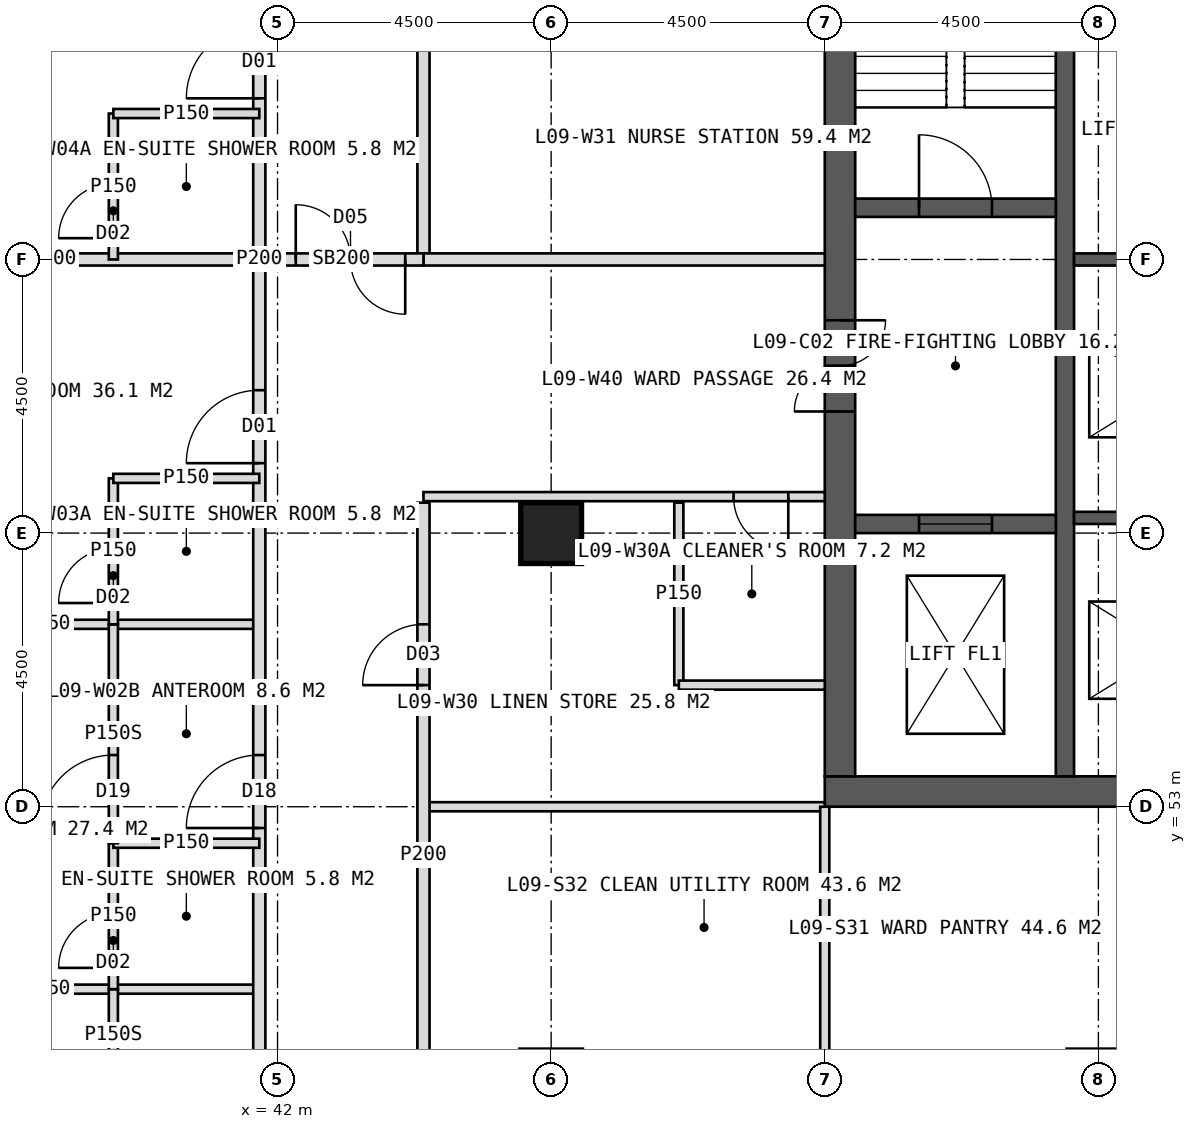
"""IFC4 building model, lengths in metres.
Left out: names, types, materials, properties, quantities, classifications, styles, units other than length and angle.
Written with IfcOpenShell. Run it as: python <this file> out.ifc"""

import sys

from ifc_helpers import new_model, si_unit, direction, frame, frame_2d, origin, origin_2d, place, context, subcontext, project, spatial, rectangle, hollow_rectangle, extrude, element, fill, save


model = new_model("IFC4")
c1 = context("Model", 3, precision=1e-05, world=origin(), true_north=direction((0.0, 1.0)))
c2 = subcontext(c1, "Body", "Model", "MODEL_VIEW")
j1 = project(units=[si_unit("LENGTHUNIT", "METRE"), si_unit("PLANEANGLEUNIT", "RADIAN")], contexts=[c1])
p1 = place(None, origin())
s1 = spatial("IfcSite", under=j1, at=p1, CompositionType="ELEMENT")
p2 = place(p1, origin())
s2 = spatial("IfcBuilding", under=s1, at=p2, CompositionType="ELEMENT")
p3 = place(p2, frame((0.0, 0.0, 43.0)))
s3 = spatial("IfcBuildingStorey", under=s2, at=p3, CompositionType="ELEMENT", Elevation=43.0)
p4 = place(p3, frame((51.0, 53.25, 0.0), z_axis=(0.0, 0.0, 1.0), x_axis=(1.0, 0.0, 0.0)))
e1 = element("IfcWall", 1, at=p4, inside=s3, PredefinedType="SHEAR", context=c2, shape_type="SweptSolid", body=[
    extrude(rectangle(XDim=18.0, YDim=0.5, at=frame_2d((9.0, 0.0))), origin(), (0.0, 0.0, 1.0), 4.0),
])
p5 = place(p4, frame((8.1, 0.0, 0.0)))
e2 = element("IfcOpeningElement", 2, at=p5, cuts=e1, PredefinedType="OPENING", context=c2, shape_type="SweptSolid", body=[
    extrude(rectangle(XDim=1.8, YDim=2.2, at=frame_2d((0.9, 1.1))), frame((0.0, 0.26, 0.0), z_axis=(0.0, -1.0, 0.0), x_axis=(1.0, 0.0, 0.0)), (0.0, 0.0, 1.0), 0.52),
])
p6 = place(p3, frame((51.25, 53.5, 0.0), z_axis=(0.0, 0.0, 1.0), x_axis=(0.0, 1.0, 0.0)))
e3 = element("IfcWall", 3, at=p6, inside=s3, PredefinedType="SHEAR", context=c2, shape_type="SweptSolid", body=[
    extrude(rectangle(XDim=17.0, YDim=0.5, at=frame_2d((8.5, 0.0))), origin(), (0.0, 0.0, 1.0), 4.0),
])
p7 = place(p6, frame((6.0, 0.0, 0.0)))
e4 = element("IfcOpeningElement", 4, at=p7, cuts=e3, PredefinedType="OPENING", context=c2, shape_type="SweptSolid", body=[
    extrude(rectangle(XDim=1.5, YDim=2.2, at=frame_2d((0.75, 1.1))), frame((0.0, 0.26, 0.0), z_axis=(0.0, -1.0, 0.0), x_axis=(1.0, 0.0, 0.0)), (0.0, 0.0, 1.0), 0.52),
])
p8 = place(p3, frame((54.95, 53.5, 0.0), z_axis=(0.0, 0.0, 1.0), x_axis=(0.0, 1.0, 0.0)))
e5 = element("IfcWall", 5, at=p8, inside=s3, PredefinedType="SHEAR", context=c2, shape_type="SweptSolid", body=[
    extrude(rectangle(XDim=17.0, YDim=0.3, at=frame_2d((8.5, 0.0))), origin(), (0.0, 0.0, 1.0), 4.0),
])
for number, where, z_axis, x_axis in (
    (6, (55.1, 57.75, 0.0), (0.0, 0.0, 1.0), (1.0, 0.0, 0.0)),
    (7, (55.1, 62.0, 0.0), (0.0, 0.0, 1.0), (1.0, 0.0, 0.0)),
):
    element("IfcWall", number, at=place(p3, frame(where, z_axis=z_axis, x_axis=x_axis)), inside=s3, PredefinedType="SHEAR", context=c2, shape_type="SweptSolid", body=[
        extrude(rectangle(XDim=3.05, YDim=0.2, at=frame_2d((1.525, 0.0))), origin(), (0.0, 0.0, 1.0), 4.0),
    ])
p9 = place(p3, frame((51.5, 62.85, 0.0), z_axis=(0.0, 0.0, 1.0), x_axis=(1.0, 0.0, 0.0)))
e8 = element("IfcWall", 8, at=p9, inside=s3, PredefinedType="SHEAR", context=c2, shape_type="SweptSolid", body=[
    extrude(rectangle(XDim=3.3, YDim=0.3, at=frame_2d((1.65, 0.0))), origin(), (0.0, 0.0, 1.0), 4.0),
])
p10 = place(p9, frame((1.05, 0.0, 0.0)))
e9 = element("IfcOpeningElement", 9, at=p10, cuts=e8, PredefinedType="OPENING", context=c2, shape_type="SweptSolid", body=[
    extrude(rectangle(XDim=1.2, YDim=2.1, at=frame_2d((0.6, 1.05))), frame((0.0, 0.16, 0.0), z_axis=(0.0, -1.0, 0.0), x_axis=(1.0, 0.0, 0.0)), (0.0, 0.0, 1.0), 0.32),
])
p11 = place(p3, frame((51.5, 57.65, 0.0), z_axis=(0.0, 0.0, 1.0), x_axis=(1.0, 0.0, 0.0)))
e10 = element("IfcWall", 10, at=p11, inside=s3, PredefinedType="SHEAR", context=c2, shape_type="SweptSolid", body=[
    extrude(rectangle(XDim=3.3, YDim=0.3, at=frame_2d((1.65, 0.0))), origin(), (0.0, 0.0, 1.0), 4.0),
])
p12 = place(p11, frame((1.05, 0.0, 0.0)))
e11 = element("IfcOpeningElement", 11, at=p12, cuts=e10, PredefinedType="OPENING", context=c2, shape_type="SweptSolid", body=[
    extrude(rectangle(XDim=1.2, YDim=2.2, at=frame_2d((0.6, 1.1))), frame((0.0, 0.16, 0.0), z_axis=(0.0, -1.0, 0.0), x_axis=(1.0, 0.0, 0.0)), (0.0, 0.0, 1.0), 0.32),
])
p13 = place(p3, frame((46.5, 57.5, 0.0), z_axis=(0.0, 0.0, 1.0), x_axis=(1.0, 0.0, 0.0)))
e12 = element("IfcColumn", 12, at=p13, inside=s3, PredefinedType="COLUMN", context=c2, shape_type="SweptSolid", body=[
    extrude(hollow_rectangle(XDim=1.0, YDim=1.0, WallThickness=0.1, at=origin_2d()), origin(), (0.0, 0.0, 1.0), 4.0),
])
for number, where, z_axis, x_axis in (
    (13, (41.7, 50.0, 0.0), (0.0, 0.0, 1.0), (-1.0, 0.0, 0.0)),
    (14, (41.7, 56.0, 0.0), (0.0, 0.0, 1.0), (-1.0, 0.0, 0.0)),
):
    element("IfcWall", number, at=place(p3, frame(where, z_axis=z_axis, x_axis=x_axis)), inside=s3, PredefinedType="PARTITIONING", context=c2, shape_type="SweptSolid", body=[
        extrude(rectangle(XDim=6.975, YDim=0.15, at=frame_2d((3.487, 0.0))), origin(), (0.0, 0.0, 1.0), 3.75),
    ])
p14 = place(p3, frame((41.7, 62.0, 0.0), z_axis=(0.0, 0.0, 1.0), x_axis=(-1.0, 0.0, 0.0)))
e15 = element("IfcWall", 15, at=p14, inside=s3, PredefinedType="SOLIDWALL", context=c2, shape_type="SweptSolid", body=[
    extrude(rectangle(XDim=6.975, YDim=0.2, at=frame_2d((3.487, 0.0))), origin(), (0.0, 0.0, 1.0), 2.75),
])
p15 = place(p3, frame((41.7, 43.7, 0.0), z_axis=(0.0, 0.0, 1.0), x_axis=(0.0, 1.0, 0.0)))
e16 = element("IfcWall", 16, at=p15, inside=s3, PredefinedType="PARTITIONING", context=c2, shape_type="SweptSolid", body=[
    extrude(rectangle(XDim=36.6, YDim=0.2, at=frame_2d((18.3, 0.0))), origin(), (0.0, 0.0, 1.0), 3.75),
])
p16 = place(p15, frame((2.65, 0.0, 0.0)))
e17 = element("IfcOpeningElement", 17, at=p16, cuts=e16, PredefinedType="OPENING", context=c2, shape_type="SweptSolid", body=[
    extrude(rectangle(XDim=1.2, YDim=2.2, at=frame_2d((0.6, 1.1))), frame((0.0, 0.11, 0.0), z_axis=(0.0, -1.0, 0.0), x_axis=(1.0, 0.0, 0.0)), (0.0, 0.0, 1.0), 0.22),
])
p17 = place(p15, frame((8.95, 0.0, 0.0)))
e18 = element("IfcOpeningElement", 18, at=p17, cuts=e16, PredefinedType="OPENING", context=c2, shape_type="SweptSolid", body=[
    extrude(rectangle(XDim=1.2, YDim=2.2, at=frame_2d((0.6, 1.1))), frame((0.0, 0.11, 0.0), z_axis=(0.0, -1.0, 0.0), x_axis=(1.0, 0.0, 0.0)), (0.0, 0.0, 1.0), 0.22),
])
p18 = place(p15, frame((14.95, 0.0, 0.0)))
e19 = element("IfcOpeningElement", 19, at=p18, cuts=e16, PredefinedType="OPENING", context=c2, shape_type="SweptSolid", body=[
    extrude(rectangle(XDim=1.2, YDim=2.2, at=frame_2d((0.6, 1.1))), frame((0.0, 0.11, 0.0), z_axis=(0.0, -1.0, 0.0), x_axis=(1.0, 0.0, 0.0)), (0.0, 0.0, 1.0), 0.22),
])
p19 = place(p15, frame((20.95, 0.0, 0.0)))
e20 = element("IfcOpeningElement", 20, at=p19, cuts=e16, PredefinedType="OPENING", context=c2, shape_type="SweptSolid", body=[
    extrude(rectangle(XDim=1.2, YDim=2.2, at=frame_2d((0.6, 1.1))), frame((0.0, 0.11, 0.0), z_axis=(0.0, -1.0, 0.0), x_axis=(1.0, 0.0, 0.0)), (0.0, 0.0, 1.0), 0.22),
])
p20 = place(p15, frame((29.95, 0.0, 0.0)))
e21 = element("IfcOpeningElement", 21, at=p20, cuts=e16, PredefinedType="OPENING", context=c2, shape_type="SweptSolid", body=[
    extrude(rectangle(XDim=1.2, YDim=2.2, at=frame_2d((0.6, 1.1))), frame((0.0, 0.11, 0.0), z_axis=(0.0, -1.0, 0.0), x_axis=(1.0, 0.0, 0.0)), (0.0, 0.0, 1.0), 0.22),
])
p21 = place(p3, frame((39.3, 48.5, 0.0), z_axis=(0.0, 0.0, 1.0), x_axis=(0.0, 1.0, 0.0)))
e22 = element("IfcWall", 22, at=p21, inside=s3, PredefinedType="PARTITIONING", context=c2, shape_type="SweptSolid", body=[
    extrude(rectangle(XDim=1.5, YDim=0.15, at=frame_2d((0.75, 0.0))), origin(), (0.0, 0.0, 1.0), 3.75),
])
p22 = place(p3, frame((39.3, 50.0, 0.0), z_axis=(0.0, 0.0, 1.0), x_axis=(0.0, 1.0, 0.0)))
e23 = element("IfcWall", 23, at=p22, inside=s3, PredefinedType="PARTITIONING", context=c2, shape_type="SweptSolid", body=[
    extrude(rectangle(XDim=2.4, YDim=0.15, at=frame_2d((1.2, 0.0))), origin(), (0.0, 0.0, 1.0), 3.75),
])
p23 = place(p22, frame((0.35, 0.0, 0.0)))
e24 = element("IfcOpeningElement", 24, at=p23, cuts=e23, PredefinedType="OPENING", context=c2, shape_type="SweptSolid", body=[
    extrude(rectangle(XDim=0.9, YDim=2.1, at=frame_2d((0.45, 1.05))), frame((0.0, 0.085, 0.0), z_axis=(0.0, -1.0, 0.0), x_axis=(1.0, 0.0, 0.0)), (0.0, 0.0, 1.0), 0.17),
])
p24 = place(p3, frame((41.7, 52.4, 0.0), z_axis=(0.0, 0.0, 1.0), x_axis=(-1.0, 0.0, 0.0)))
e25 = element("IfcWall", 25, at=p24, inside=s3, PredefinedType="PARTITIONING", context=c2, shape_type="SweptSolid", body=[
    extrude(rectangle(XDim=2.4, YDim=0.15, at=frame_2d((1.2, 0.0))), origin(), (0.0, 0.0, 1.0), 3.75),
])
p25 = place(p3, frame((39.3, 52.4, 0.0), z_axis=(0.0, 0.0, 1.0), x_axis=(0.0, 1.0, 0.0)))
e26 = element("IfcWall", 26, at=p25, inside=s3, PredefinedType="PARTITIONING", context=c2, shape_type="SweptSolid", body=[
    extrude(rectangle(XDim=3.6, YDim=0.15, at=frame_2d((1.8, 0.0))), origin(), (0.0, 0.0, 1.0), 3.75),
])
p26 = place(p25, frame((0.25, 0.0, 0.0)))
e27 = element("IfcOpeningElement", 27, at=p26, cuts=e26, PredefinedType="OPENING", context=c2, shape_type="SweptSolid", body=[
    extrude(rectangle(XDim=1.2, YDim=2.2, at=frame_2d((0.6, 1.1))), frame((0.0, 0.085, 0.0), z_axis=(0.0, -1.0, 0.0), x_axis=(1.0, 0.0, 0.0)), (0.0, 0.0, 1.0), 0.17),
])
p27 = place(p3, frame((39.3, 56.0, 0.0), z_axis=(0.0, 0.0, 1.0), x_axis=(0.0, 1.0, 0.0)))
e28 = element("IfcWall", 28, at=p27, inside=s3, PredefinedType="PARTITIONING", context=c2, shape_type="SweptSolid", body=[
    extrude(rectangle(XDim=2.4, YDim=0.15, at=frame_2d((1.2, 0.0))), origin(), (0.0, 0.0, 1.0), 3.75),
])
p28 = place(p27, frame((0.35, 0.0, 0.0)))
e29 = element("IfcOpeningElement", 29, at=p28, cuts=e28, PredefinedType="OPENING", context=c2, shape_type="SweptSolid", body=[
    extrude(rectangle(XDim=0.9, YDim=2.1, at=frame_2d((0.45, 1.05))), frame((0.0, 0.085, 0.0), z_axis=(0.0, -1.0, 0.0), x_axis=(1.0, 0.0, 0.0)), (0.0, 0.0, 1.0), 0.17),
])
p29 = place(p3, frame((41.7, 58.4, 0.0), z_axis=(0.0, 0.0, 1.0), x_axis=(-1.0, 0.0, 0.0)))
e30 = element("IfcWall", 30, at=p29, inside=s3, PredefinedType="PARTITIONING", context=c2, shape_type="SweptSolid", body=[
    extrude(rectangle(XDim=2.4, YDim=0.15, at=frame_2d((1.2, 0.0))), origin(), (0.0, 0.0, 1.0), 3.75),
])
p30 = place(p3, frame((39.3, 62.0, 0.0), z_axis=(0.0, 0.0, 1.0), x_axis=(0.0, 1.0, 0.0)))
e31 = element("IfcWall", 31, at=p30, inside=s3, PredefinedType="PARTITIONING", context=c2, shape_type="SweptSolid", body=[
    extrude(rectangle(XDim=2.4, YDim=0.15, at=frame_2d((1.2, 0.0))), origin(), (0.0, 0.0, 1.0), 3.75),
])
p31 = place(p30, frame((0.35, 0.0, 0.0)))
e32 = element("IfcOpeningElement", 32, at=p31, cuts=e31, PredefinedType="OPENING", context=c2, shape_type="SweptSolid", body=[
    extrude(rectangle(XDim=0.9, YDim=2.1, at=frame_2d((0.45, 1.05))), frame((0.0, 0.085, 0.0), z_axis=(0.0, -1.0, 0.0), x_axis=(1.0, 0.0, 0.0)), (0.0, 0.0, 1.0), 0.17),
])
p32 = place(p3, frame((41.7, 64.4, 0.0), z_axis=(0.0, 0.0, 1.0), x_axis=(-1.0, 0.0, 0.0)))
e33 = element("IfcWall", 33, at=p32, inside=s3, PredefinedType="PARTITIONING", context=c2, shape_type="SweptSolid", body=[
    extrude(rectangle(XDim=2.4, YDim=0.15, at=frame_2d((1.2, 0.0))), origin(), (0.0, 0.0, 1.0), 3.75),
])
p33 = place(p3, frame((51.0, 53.0, 0.0), z_axis=(0.0, 0.0, 1.0), x_axis=(-1.0, 0.0, 0.0)))
e34 = element("IfcWall", 34, at=p33, inside=s3, PredefinedType="PARTITIONING", context=c2, shape_type="SweptSolid", body=[
    extrude(rectangle(XDim=6.6, YDim=0.15, at=frame_2d((3.3, 0.0))), origin(), (0.0, 0.0, 1.0), 3.75),
])
p34 = place(p3, frame((44.4, 46.4, 0.0), z_axis=(0.0, 0.0, 1.0), x_axis=(0.0, 1.0, 0.0)))
e35 = element("IfcWall", 35, at=p34, inside=s3, PredefinedType="PARTITIONING", context=c2, shape_type="SweptSolid", body=[
    extrude(rectangle(XDim=11.6, YDim=0.2, at=frame_2d((5.8, 0.0))), origin(), (0.0, 0.0, 1.0), 3.75),
])
p35 = place(p34, frame((8.6, 0.0, 0.0)))
e36 = element("IfcOpeningElement", 36, at=p35, cuts=e35, PredefinedType="OPENING", context=c2, shape_type="SweptSolid", body=[
    extrude(rectangle(XDim=1.0, YDim=2.1, at=frame_2d((0.5, 1.05))), frame((0.0, 0.11, 0.0), z_axis=(0.0, -1.0, 0.0), x_axis=(1.0, 0.0, 0.0)), (0.0, 0.0, 1.0), 0.22),
])
p36 = place(p3, frame((44.4, 62.0, 0.0), z_axis=(0.0, 0.0, 1.0), x_axis=(0.0, 1.0, 0.0)))
e37 = element("IfcWall", 37, at=p36, inside=s3, PredefinedType="PARTITIONING", context=c2, shape_type="SweptSolid", body=[
    extrude(rectangle(XDim=15.6, YDim=0.2, at=frame_2d((7.8, 0.0))), origin(), (0.0, 0.0, 1.0), 3.75),
])
p37 = place(p36, frame((4.0, 0.0, 0.0)))
e38 = element("IfcOpeningElement", 38, at=p37, cuts=e37, PredefinedType="OPENING", context=c2, shape_type="SweptSolid", body=[
    extrude(rectangle(XDim=1.0, YDim=2.1, at=frame_2d((0.5, 1.05))), frame((0.0, 0.11, 0.0), z_axis=(0.0, -1.0, 0.0), x_axis=(1.0, 0.0, 0.0)), (0.0, 0.0, 1.0), 0.22),
])
p38 = place(p36, frame((11.8, 0.0, 0.0)))
e39 = element("IfcOpeningElement", 39, at=p38, cuts=e37, PredefinedType="OPENING", context=c2, shape_type="SweptSolid", body=[
    extrude(rectangle(XDim=1.0, YDim=2.1, at=frame_2d((0.5, 1.05))), frame((0.0, 0.11, 0.0), z_axis=(0.0, -1.0, 0.0), x_axis=(1.0, 0.0, 0.0)), (0.0, 0.0, 1.0), 0.22),
])
p39 = place(p3, frame((51.0, 58.1, 0.0), z_axis=(0.0, 0.0, 1.0), x_axis=(-1.0, 0.0, 0.0)))
e40 = element("IfcWall", 40, at=p39, inside=s3, PredefinedType="PARTITIONING", context=c2, shape_type="SweptSolid", body=[
    extrude(rectangle(XDim=6.6, YDim=0.15, at=frame_2d((3.3, 0.0))), origin(), (0.0, 0.0, 1.0), 3.75),
])
p40 = place(p39, frame((0.6, 0.0, 0.0)))
e41 = element("IfcOpeningElement", 41, at=p40, cuts=e40, PredefinedType="OPENING", context=c2, shape_type="SweptSolid", body=[
    extrude(rectangle(XDim=0.9, YDim=2.1, at=frame_2d((0.45, 1.05))), frame((0.0, 0.085, 0.0), z_axis=(0.0, -1.0, 0.0), x_axis=(1.0, 0.0, 0.0)), (0.0, 0.0, 1.0), 0.17),
])
p41 = place(p3, frame((51.0, 62.0, 0.0), z_axis=(0.0, 0.0, 1.0), x_axis=(-1.0, 0.0, 0.0)))
e42 = element("IfcWall", 42, at=p41, inside=s3, PredefinedType="SOLIDWALL", context=c2, shape_type="SweptSolid", body=[
    extrude(rectangle(XDim=6.6, YDim=0.2, at=frame_2d((3.3, 0.0))), origin(), (0.0, 0.0, 1.0), 2.75),
])
p42 = place(p3, frame((48.6, 55.0, 0.0), z_axis=(0.0, 0.0, 1.0), x_axis=(0.0, 1.0, 0.0)))
e43 = element("IfcWall", 43, at=p42, inside=s3, PredefinedType="PARTITIONING", context=c2, shape_type="SweptSolid", body=[
    extrude(rectangle(XDim=3.0, YDim=0.15, at=frame_2d((1.5, 0.0))), origin(), (0.0, 0.0, 1.0), 3.75),
])
p43 = place(p3, frame((51.0, 55.0, 0.0), z_axis=(0.0, 0.0, 1.0), x_axis=(-1.0, 0.0, 0.0)))
e44 = element("IfcWall", 44, at=p43, inside=s3, PredefinedType="PARTITIONING", context=c2, shape_type="SweptSolid", body=[
    extrude(rectangle(XDim=2.4, YDim=0.15, at=frame_2d((1.2, 0.0))), origin(), (0.0, 0.0, 1.0), 3.75),
])
p44 = place(p3, frame((51.0, 53.0, 0.0), z_axis=(0.0, 0.0, 1.0), x_axis=(0.0, -1.0, 0.0)))
e45 = element("IfcWall", 45, at=p44, inside=s3, PredefinedType="PARTITIONING", context=c2, shape_type="SweptSolid", body=[
    extrude(rectangle(XDim=6.6, YDim=0.15, at=frame_2d((3.3, 0.0))), origin(), (0.0, 0.0, 1.0), 3.75),
])
p45 = place(p3, frame((44.4, 62.0, 0.0), z_axis=(0.0, 0.0, 1.0), x_axis=(-1.0, 0.0, 0.0)))
e46 = element("IfcWall", 46, at=p45, inside=s3, PredefinedType="SOLIDWALL", context=c2, shape_type="SweptSolid", body=[
    extrude(rectangle(XDim=2.7, YDim=0.2, at=frame_2d((1.35, 0.0))), origin(), (0.0, 0.0, 1.0), 2.75),
])
p46 = place(p45, frame((0.3, 0.0, 0.0)))
e47 = element("IfcOpeningElement", 47, at=p46, cuts=e46, PredefinedType="OPENING", context=c2, shape_type="SweptSolid", body=[
    extrude(rectangle(XDim=1.8, YDim=2.2, at=frame_2d((0.9, 1.1))), frame((0.0, 0.11, 0.0), z_axis=(0.0, -1.0, 0.0), x_axis=(1.0, 0.0, 0.0)), (0.0, 0.0, 1.0), 0.22),
])
p47 = place(p26, origin())
e48 = element("IfcDoor", 48, at=p47, inside=s3, OperationType="SINGLE_SWING_LEFT", PredefinedType="DOOR", context=c2, shape_type="SweptSolid", body=[
    extrude(rectangle(XDim=1.2, YDim=2.2, at=frame_2d((0.6, 1.1))), frame((0.0, 0.025, 0.0), z_axis=(0.0, -1.0, 0.0), x_axis=(1.0, 0.0, 0.0)), (0.0, 0.0, 1.0), 0.05),
])
fill(e27, e48)
p48 = place(p17, origin())
e49 = element("IfcDoor", 49, at=p48, inside=s3, OperationType="SINGLE_SWING_LEFT", PredefinedType="DOOR", context=c2, shape_type="SweptSolid", body=[
    extrude(rectangle(XDim=1.2, YDim=2.2, at=frame_2d((0.6, 1.1))), frame((0.0, 0.025, 0.0), z_axis=(0.0, -1.0, 0.0), x_axis=(1.0, 0.0, 0.0)), (0.0, 0.0, 1.0), 0.05),
])
fill(e18, e49)
p49 = place(p23, origin())
e50 = element("IfcDoor", 50, at=p49, inside=s3, OperationType="SINGLE_SWING_LEFT", PredefinedType="DOOR", context=c2, shape_type="SweptSolid", body=[
    extrude(rectangle(XDim=0.9, YDim=2.1, at=frame_2d((0.45, 1.05))), frame((0.0, 0.025, 0.0), z_axis=(0.0, -1.0, 0.0), x_axis=(1.0, 0.0, 0.0)), (0.0, 0.0, 1.0), 0.05),
])
fill(e24, e50)
p50 = place(p18, origin())
e51 = element("IfcDoor", 51, at=p50, inside=s3, OperationType="SINGLE_SWING_LEFT", PredefinedType="DOOR", context=c2, shape_type="SweptSolid", body=[
    extrude(rectangle(XDim=1.2, YDim=2.2, at=frame_2d((0.6, 1.1))), frame((0.0, 0.025, 0.0), z_axis=(0.0, -1.0, 0.0), x_axis=(1.0, 0.0, 0.0)), (0.0, 0.0, 1.0), 0.05),
])
fill(e19, e51)
p51 = place(p28, origin())
e52 = element("IfcDoor", 52, at=p51, inside=s3, OperationType="SINGLE_SWING_LEFT", PredefinedType="DOOR", context=c2, shape_type="SweptSolid", body=[
    extrude(rectangle(XDim=0.9, YDim=2.1, at=frame_2d((0.45, 1.05))), frame((0.0, 0.025, 0.0), z_axis=(0.0, -1.0, 0.0), x_axis=(1.0, 0.0, 0.0)), (0.0, 0.0, 1.0), 0.05),
])
fill(e29, e52)
p52 = place(p19, origin())
e53 = element("IfcDoor", 53, at=p52, inside=s3, OperationType="SINGLE_SWING_LEFT", PredefinedType="DOOR", context=c2, shape_type="SweptSolid", body=[
    extrude(rectangle(XDim=1.2, YDim=2.2, at=frame_2d((0.6, 1.1))), frame((0.0, 0.025, 0.0), z_axis=(0.0, -1.0, 0.0), x_axis=(1.0, 0.0, 0.0)), (0.0, 0.0, 1.0), 0.05),
])
fill(e20, e53)
p53 = place(p31, origin())
e54 = element("IfcDoor", 54, at=p53, inside=s3, OperationType="SINGLE_SWING_LEFT", PredefinedType="DOOR", context=c2, shape_type="SweptSolid", body=[
    extrude(rectangle(XDim=0.9, YDim=2.1, at=frame_2d((0.45, 1.05))), frame((0.0, 0.025, 0.0), z_axis=(0.0, -1.0, 0.0), x_axis=(1.0, 0.0, 0.0)), (0.0, 0.0, 1.0), 0.05),
])
fill(e32, e54)
p54 = place(p40, origin())
e55 = element("IfcDoor", 55, at=p54, inside=s3, OperationType="SINGLE_SWING_LEFT", PredefinedType="DOOR", context=c2, shape_type="SweptSolid", body=[
    extrude(rectangle(XDim=0.9, YDim=2.1, at=frame_2d((0.45, 1.05))), frame((0.0, 0.025, 0.0), z_axis=(0.0, -1.0, 0.0), x_axis=(1.0, 0.0, 0.0)), (0.0, 0.0, 1.0), 0.05),
])
fill(e41, e55)
p55 = place(p35, origin())
e56 = element("IfcDoor", 56, at=p55, inside=s3, OperationType="SINGLE_SWING_LEFT", PredefinedType="DOOR", context=c2, shape_type="SweptSolid", body=[
    extrude(rectangle(XDim=1.0, YDim=2.1, at=frame_2d((0.5, 1.05))), frame((0.0, 0.025, 0.0), z_axis=(0.0, -1.0, 0.0), x_axis=(1.0, 0.0, 0.0)), (0.0, 0.0, 1.0), 0.05),
])
fill(e36, e56)
p56 = place(p46, origin())
e57 = element("IfcDoor", 57, at=p56, inside=s3, OperationType="DOUBLE_DOOR_DOUBLE_SWING", PredefinedType="DOOR", context=c2, shape_type="SweptSolid", body=[
    extrude(rectangle(XDim=1.8, YDim=2.2, at=frame_2d((0.9, 1.1))), frame((0.0, 0.025, 0.0), z_axis=(0.0, -1.0, 0.0), x_axis=(1.0, 0.0, 0.0)), (0.0, 0.0, 1.0), 0.05),
])
fill(e47, e57)
p57 = place(p7, origin())
e58 = element("IfcDoor", 58, at=p57, inside=s3, OperationType="DOUBLE_DOOR_SINGLE_SWING", PredefinedType="DOOR", context=c2, shape_type="SweptSolid", body=[
    extrude(rectangle(XDim=1.5, YDim=2.2, at=frame_2d((0.75, 1.1))), frame((0.0, 0.025, 0.0), z_axis=(0.0, -1.0, 0.0), x_axis=(1.0, 0.0, 0.0)), (0.0, 0.0, 1.0), 0.05),
])
fill(e4, e58)
p58 = place(p10, origin())
e59 = element("IfcDoor", 59, at=p58, inside=s3, OperationType="SINGLE_SWING_LEFT", PredefinedType="DOOR", context=c2, shape_type="SweptSolid", body=[
    extrude(rectangle(XDim=1.2, YDim=2.1, at=frame_2d((0.6, 1.05))), frame((0.0, 0.025, 0.0), z_axis=(0.0, -1.0, 0.0), x_axis=(1.0, 0.0, 0.0)), (0.0, 0.0, 1.0), 0.05),
])
fill(e9, e59)
p59 = place(p12, origin())
e60 = element("IfcDoor", 60, at=p59, inside=s3, OperationType="SLIDING_TO_LEFT", PredefinedType="DOOR", context=c2, shape_type="SweptSolid", body=[
    extrude(rectangle(XDim=1.2, YDim=2.2, at=frame_2d((0.6, 1.1))), frame((0.0, 0.025, 0.0), z_axis=(0.0, -1.0, 0.0), x_axis=(1.0, 0.0, 0.0)), (0.0, 0.0, 1.0), 0.05),
])
fill(e11, e60)
save(model, sys.argv[1])
